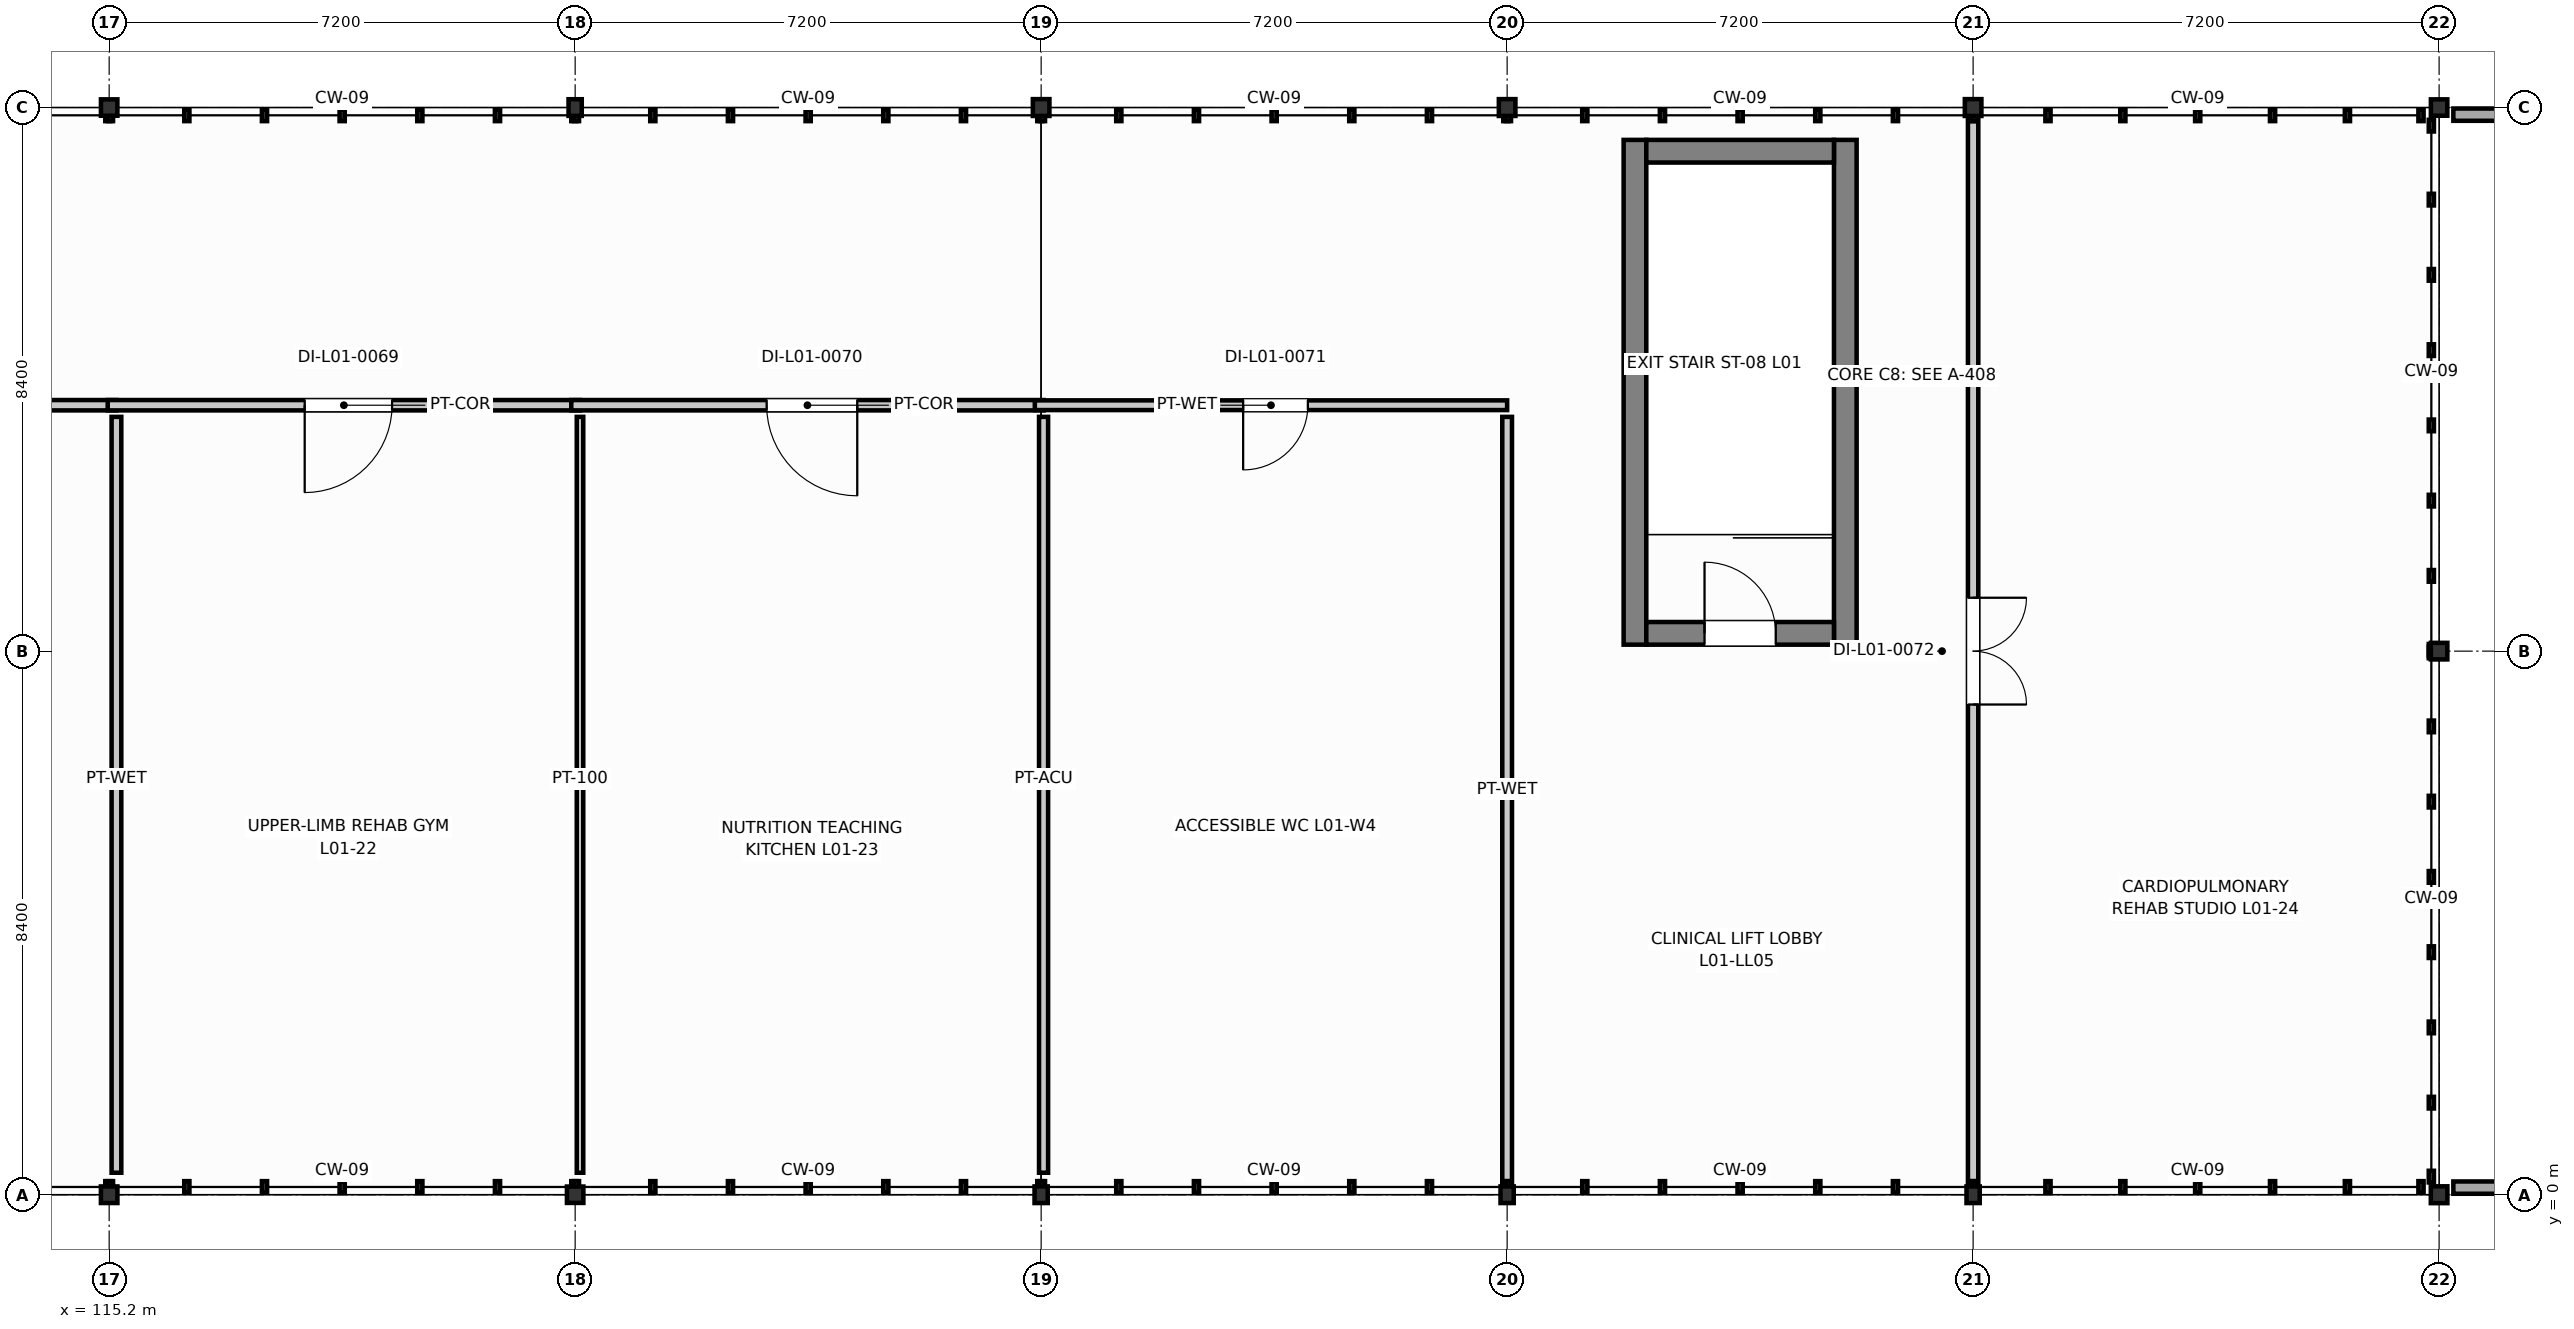
"""IFC4 building model, lengths in metres.
Left out: names, types, materials, properties, quantities, classifications, styles, units other than length and angle.
Written with IfcOpenShell. Run it as: python <this file> out.ifc"""

import sys

from ifc_helpers import new_model, si_unit, direction, frame, frame_2d, origin, origin_2d, place, context, subcontext, project, spatial, rectangle, i_section, extrude, element, fill, save


model = new_model("IFC4")
c1 = context("Model", 3, precision=1e-05, world=origin(), true_north=direction((0.0, 1.0)))
c2 = subcontext(c1, "Body", "Model", "MODEL_VIEW")
j1 = project(units=[si_unit("LENGTHUNIT", "METRE"), si_unit("PLANEANGLEUNIT", "RADIAN")], contexts=[c1])
p1 = place(None, origin())
s1 = spatial("IfcSite", under=j1, at=p1, CompositionType="ELEMENT")
p2 = place(p1, origin())
s2 = spatial("IfcBuilding", under=s1, at=p2, CompositionType="ELEMENT")
p3 = place(p2, frame((0.0, 0.0, 4.8)))
s3 = spatial("IfcBuildingStorey", under=s2, at=p3, CompositionType="ELEMENT", Elevation=4.8)
p4 = place(p3, frame((115.2, 0.0, 0.0), z_axis=(0.0, 0.0, 1.0), x_axis=(1.0, 0.0, 0.0)))
e1 = element("IfcColumn", 1, at=p4, inside=s3, PredefinedType="COLUMN", context=c2, shape_type="SweptSolid", body=[
    extrude(i_section(OverallWidth=0.255, OverallDepth=0.256, WebThickness=0.01, FlangeThickness=0.016, FilletRadius=0.013, at=origin_2d()), origin(), (0.0, 0.0, 1.0), 4.2),
])
for number, where, z_axis, x_axis in (
    (2, (115.2, 16.8, 0.0), (0.0, 0.0, 1.0), (1.0, 0.0, 0.0)),
    (3, (122.4, 0.0, 0.0), (0.0, 0.0, 1.0), (1.0, 0.0, 0.0)),
):
    element("IfcColumn", number, at=place(p3, frame(where, z_axis=z_axis, x_axis=x_axis)), inside=s3, PredefinedType="COLUMN", context=c2, shape_type="SweptSolid", body=[
        extrude(i_section(OverallWidth=0.254, OverallDepth=0.253, WebThickness=0.009, FlangeThickness=0.014, FilletRadius=0.013, at=origin_2d()), origin(), (0.0, 0.0, 1.0), 4.2),
    ])
for number, where, z_axis, x_axis in (
    (4, (122.4, 16.8, 0.0), (0.0, 0.0, 1.0), (1.0, 0.0, 0.0)),
    (5, (129.6, 0.0, 0.0), (0.0, 0.0, 1.0), (1.0, 0.0, 0.0)),
):
    element("IfcColumn", number, at=place(p3, frame(where, z_axis=z_axis, x_axis=x_axis)), inside=s3, PredefinedType="COLUMN", context=c2, shape_type="SweptSolid", body=[
        extrude(i_section(OverallWidth=0.204, OverallDepth=0.257, WebThickness=0.009, FlangeThickness=0.016, FilletRadius=0.013, at=origin_2d()), origin(), (0.0, 0.0, 1.0), 4.2),
    ])
p5 = place(p3, frame((129.6, 16.8, 0.0), z_axis=(0.0, 0.0, 1.0), x_axis=(1.0, 0.0, 0.0)))
e6 = element("IfcColumn", 6, at=p5, inside=s3, PredefinedType="COLUMN", context=c2, shape_type="SweptSolid", body=[
    extrude(i_section(OverallWidth=0.256, OverallDepth=0.26, WebThickness=0.011, FlangeThickness=0.017, FilletRadius=0.013, at=origin_2d()), origin(), (0.0, 0.0, 1.0), 4.2),
])
p6 = place(p3, frame((136.8, 0.0, 0.0), z_axis=(0.0, 0.0, 1.0), x_axis=(1.0, 0.0, 0.0)))
e7 = element("IfcColumn", 7, at=p6, inside=s3, PredefinedType="COLUMN", context=c2, shape_type="SweptSolid", body=[
    extrude(i_section(OverallWidth=0.204, OverallDepth=0.257, WebThickness=0.009, FlangeThickness=0.016, FilletRadius=0.013, at=origin_2d()), origin(), (0.0, 0.0, 1.0), 4.2),
])
p7 = place(p3, frame((136.8, 16.8, 0.0), z_axis=(0.0, 0.0, 1.0), x_axis=(1.0, 0.0, 0.0)))
e8 = element("IfcColumn", 8, at=p7, inside=s3, PredefinedType="COLUMN", context=c2, shape_type="SweptSolid", body=[
    extrude(i_section(OverallWidth=0.256, OverallDepth=0.26, WebThickness=0.011, FlangeThickness=0.017, FilletRadius=0.013, at=origin_2d()), origin(), (0.0, 0.0, 1.0), 4.2),
])
p8 = place(p3, frame((144.0, 0.0, 0.0), z_axis=(0.0, 0.0, 1.0), x_axis=(1.0, 0.0, 0.0)))
e9 = element("IfcColumn", 9, at=p8, inside=s3, PredefinedType="COLUMN", context=c2, shape_type="SweptSolid", body=[
    extrude(i_section(OverallWidth=0.204, OverallDepth=0.257, WebThickness=0.009, FlangeThickness=0.016, FilletRadius=0.013, at=origin_2d()), origin(), (0.0, 0.0, 1.0), 4.2),
])
for number, where, z_axis, x_axis in (
    (10, (144.0, 16.8, 0.0), (0.0, 0.0, 1.0), (1.0, 0.0, 0.0)),
    (11, (151.2, 0.0, 0.0), (0.0, 0.0, 1.0), (1.0, 0.0, 0.0)),
):
    element("IfcColumn", number, at=place(p3, frame(where, z_axis=z_axis, x_axis=x_axis)), inside=s3, PredefinedType="COLUMN", context=c2, shape_type="SweptSolid", body=[
        extrude(i_section(OverallWidth=0.256, OverallDepth=0.26, WebThickness=0.011, FlangeThickness=0.017, FilletRadius=0.013, at=origin_2d()), origin(), (0.0, 0.0, 1.0), 4.2),
    ])
p9 = place(p3, frame((151.2, 8.4, 0.0), z_axis=(0.0, 0.0, 1.0), x_axis=(1.0, 0.0, 0.0)))
e12 = element("IfcColumn", 12, at=p9, inside=s3, PredefinedType="COLUMN", context=c2, shape_type="SweptSolid", body=[
    extrude(i_section(OverallWidth=0.255, OverallDepth=0.256, WebThickness=0.01, FlangeThickness=0.016, FilletRadius=0.013, at=origin_2d()), origin(), (0.0, 0.0, 1.0), 4.2),
])
p10 = place(p3, frame((151.2, 16.8, 0.0), z_axis=(0.0, 0.0, 1.0), x_axis=(1.0, 0.0, 0.0)))
e13 = element("IfcColumn", 13, at=p10, inside=s3, PredefinedType="COLUMN", context=c2, shape_type="SweptSolid", body=[
    extrude(i_section(OverallWidth=0.254, OverallDepth=0.253, WebThickness=0.009, FlangeThickness=0.014, FilletRadius=0.013, at=origin_2d()), origin(), (0.0, 0.0, 1.0), 4.2),
])
for number, where, z_axis, x_axis in (
    (14, (138.775, 8.5, 0.0), (0.0, 0.0, 1.0), (0.0, 1.0, 0.0)),
    (15, (142.025, 8.5, 0.0), (0.0, 0.0, 1.0), (0.0, 1.0, 0.0)),
):
    element("IfcWall", number, at=place(p3, frame(where, z_axis=z_axis, x_axis=x_axis)), inside=s3, PredefinedType="SHEAR", context=c2, shape_type="SweptSolid", body=[
        extrude(rectangle(XDim=7.8, YDim=0.35, at=frame_2d((3.9, 0.0))), origin(), (0.0, 0.0, 1.0), 4.0),
    ])
p11 = place(p3, frame((138.95, 16.125, 0.0), z_axis=(0.0, 0.0, 1.0), x_axis=(1.0, 0.0, 0.0)))
e16 = element("IfcWall", 16, at=p11, inside=s3, PredefinedType="SHEAR", context=c2, shape_type="SweptSolid", body=[
    extrude(rectangle(XDim=2.9, YDim=0.35, at=frame_2d((1.45, 0.0))), origin(), (0.0, 0.0, 1.0), 4.0),
])
p12 = place(p3, frame((138.95, 8.675, 0.0), z_axis=(0.0, 0.0, 1.0), x_axis=(1.0, 0.0, 0.0)))
e17 = element("IfcWall", 17, at=p12, inside=s3, PredefinedType="SHEAR", context=c2, shape_type="SweptSolid", body=[
    extrude(rectangle(XDim=2.9, YDim=0.35, at=frame_2d((1.45, 0.0))), origin(), (0.0, 0.0, 1.0), 4.0),
])
p13 = place(p12, frame((0.9, 0.0, 0.0)))
e18 = element("IfcOpeningElement", 18, at=p13, cuts=e17, PredefinedType="OPENING", context=c2, shape_type="SweptSolid", body=[
    extrude(rectangle(XDim=1.1, YDim=2.15, at=frame_2d((0.55, 1.075))), frame((0.0, 0.185, 0.0), z_axis=(0.0, -1.0, 0.0), x_axis=(1.0, 0.0, 0.0)), (0.0, 0.0, 1.0), 0.37),
])
p14 = place(p3, frame((151.42, 0.11, 0.0), z_axis=(0.0, 0.0, 1.0), x_axis=(1.0, 0.0, 0.0)))
e19 = element("IfcWall", 19, at=p14, inside=s3, PredefinedType="PARAPET", context=c2, shape_type="SweptSolid", body=[
    extrude(rectangle(XDim=11.56, YDim=0.19, at=frame_2d((5.78, 0.0))), origin(), (0.0, 0.0, 1.0), 1.15),
])
p15 = place(p3, frame((162.923, 16.69, 0.0), z_axis=(0.0, 0.0, 1.0), x_axis=(-1.0, 0.0, 0.0)))
e20 = element("IfcWall", 20, at=p15, inside=s3, PredefinedType="PARAPET", context=c2, shape_type="SweptSolid", body=[
    extrude(rectangle(XDim=11.503, YDim=0.19, at=frame_2d((5.751, 0.0))), origin(), (0.0, 0.0, 1.0), 1.15),
])
p16 = place(p3, frame((108.34, 12.2, 0.0), z_axis=(0.0, 0.0, 1.0), x_axis=(1.0, 0.0, 0.0)))
e21 = element("IfcWall", 21, at=p16, inside=s3, PredefinedType="PARTITIONING", context=c2, shape_type="SweptSolid", body=[
    extrude(rectangle(XDim=6.972, YDim=0.16, at=frame_2d((3.486, 0.0))), origin(), (0.0, 0.0, 1.0), 3.018),
])
p17 = place(p16, frame((2.806, 0.0, 0.0)))
e22 = element("IfcOpeningElement", 22, at=p17, cuts=e21, PredefinedType="OPENING", context=c2, shape_type="SweptSolid", body=[
    extrude(rectangle(XDim=1.5, YDim=2.2, at=frame_2d((0.75, 1.1))), frame((0.0, 0.09, 0.0), z_axis=(0.0, -1.0, 0.0), x_axis=(1.0, 0.0, 0.0)), (0.0, 0.0, 1.0), 0.18),
])
p18 = place(p3, frame((115.312, 12.02, 0.0), z_axis=(0.0, 0.0, 1.0), x_axis=(0.0, -1.0, 0.0)))
e23 = element("IfcWall", 23, at=p18, inside=s3, PredefinedType="PLUMBINGWALL", context=c2, shape_type="SweptSolid", body=[
    extrude(rectangle(XDim=11.68, YDim=0.15, at=frame_2d((5.84, 0.0))), origin(), (0.0, 0.0, 1.0), 3.018),
])
p19 = place(p3, frame((115.177, 12.2, 0.0), z_axis=(0.0, 0.0, 1.0), x_axis=(1.0, 0.0, 0.0)))
e24 = element("IfcWall", 24, at=p19, inside=s3, PredefinedType="PARTITIONING", context=c2, shape_type="SweptSolid", body=[
    extrude(rectangle(XDim=7.298, YDim=0.16, at=frame_2d((3.649, 0.0))), origin(), (0.0, 0.0, 1.0), 3.018),
])
p20 = place(p19, frame((3.044, 0.0, 0.0)))
e25 = element("IfcOpeningElement", 25, at=p20, cuts=e24, PredefinedType="OPENING", context=c2, shape_type="SweptSolid", body=[
    extrude(rectangle(XDim=1.35, YDim=2.15, at=frame_2d((0.675, 1.075))), frame((0.0, 0.09, 0.0), z_axis=(0.0, -1.0, 0.0), x_axis=(1.0, 0.0, 0.0)), (0.0, 0.0, 1.0), 0.18),
])
p21 = place(p3, frame((122.475, 12.02, 0.0), z_axis=(0.0, 0.0, 1.0), x_axis=(0.0, -1.0, 0.0)))
e26 = element("IfcWall", 26, at=p21, inside=s3, PredefinedType="PARTITIONING", context=c2, shape_type="SweptSolid", body=[
    extrude(rectangle(XDim=11.68, YDim=0.1, at=frame_2d((5.84, 0.0))), origin(), (0.0, 0.0, 1.0), 3.018),
])
p22 = place(p3, frame((122.34, 12.2, 0.0), z_axis=(0.0, 0.0, 1.0), x_axis=(1.0, 0.0, 0.0)))
e27 = element("IfcWall", 27, at=p22, inside=s3, PredefinedType="PARTITIONING", context=c2, shape_type="SweptSolid", body=[
    extrude(rectangle(XDim=7.297, YDim=0.16, at=frame_2d((3.649, 0.0))), origin(), (0.0, 0.0, 1.0), 3.018),
])
p23 = place(p22, frame((3.019, 0.0, 0.0)))
e28 = element("IfcOpeningElement", 28, at=p23, cuts=e27, PredefinedType="OPENING", context=c2, shape_type="SweptSolid", body=[
    extrude(rectangle(XDim=1.4, YDim=2.2, at=frame_2d((0.7, 1.1))), frame((0.0, 0.09, 0.0), z_axis=(0.0, -1.0, 0.0), x_axis=(1.0, 0.0, 0.0)), (0.0, 0.0, 1.0), 0.18),
])
p24 = place(p3, frame((129.637, 12.02, 0.0), z_axis=(0.0, 0.0, 1.0), x_axis=(0.0, -1.0, 0.0)))
e29 = element("IfcWall", 29, at=p24, inside=s3, PredefinedType="PARTITIONING", context=c2, shape_type="SweptSolid", body=[
    extrude(rectangle(XDim=11.68, YDim=0.14, at=frame_2d((5.84, 0.0))), origin(), (0.0, 0.0, 1.0), 3.018),
])
p25 = place(p3, frame((129.502, 12.2, 0.0), z_axis=(0.0, 0.0, 1.0), x_axis=(1.0, 0.0, 0.0)))
e30 = element("IfcWall", 30, at=p25, inside=s3, PredefinedType="PLUMBINGWALL", context=c2, shape_type="SweptSolid", body=[
    extrude(rectangle(XDim=7.298, YDim=0.15, at=frame_2d((3.649, 0.0))), origin(), (0.0, 0.0, 1.0), 3.018),
])
p26 = place(p25, frame((3.219, 0.0, 0.0)))
e31 = element("IfcOpeningElement", 31, at=p26, cuts=e30, PredefinedType="OPENING", context=c2, shape_type="SweptSolid", body=[
    extrude(rectangle(XDim=1.0, YDim=2.1, at=frame_2d((0.5, 1.05))), frame((0.0, 0.085, 0.0), z_axis=(0.0, -1.0, 0.0), x_axis=(1.0, 0.0, 0.0)), (0.0, 0.0, 1.0), 0.17),
])
p27 = place(p3, frame((136.8, 12.02, 0.0), z_axis=(0.0, 0.0, 1.0), x_axis=(0.0, -1.0, 0.0)))
e32 = element("IfcWall", 32, at=p27, inside=s3, PredefinedType="PLUMBINGWALL", context=c2, shape_type="SweptSolid", body=[
    extrude(rectangle(XDim=12.01, YDim=0.15, at=frame_2d((6.005, 0.0))), origin(), (0.0, 0.0, 1.0), 3.018),
])
p28 = place(p3, frame((144.0, 0.01, 0.0), z_axis=(0.0, 0.0, 1.0), x_axis=(0.0, 1.0, 0.0)))
e33 = element("IfcWall", 33, at=p28, inside=s3, PredefinedType="PARTITIONING", context=c2, shape_type="SweptSolid", body=[
    extrude(rectangle(XDim=16.78, YDim=0.16, at=frame_2d((8.39, 0.0))), origin(), (0.0, 0.0, 1.0), 3.018),
])
p29 = place(p28, frame((7.565, 0.0, 0.0)))
e34 = element("IfcOpeningElement", 34, at=p29, cuts=e33, PredefinedType="OPENING", context=c2, shape_type="SweptSolid", body=[
    extrude(rectangle(XDim=1.65, YDim=2.2, at=frame_2d((0.825, 1.1))), frame((0.0, 0.09, 0.0), z_axis=(0.0, -1.0, 0.0), x_axis=(1.0, 0.0, 0.0)), (0.0, 0.0, 1.0), 0.18),
])
p30 = place(p13, origin())
e35 = element("IfcDoor", 35, at=p30, inside=s3, OperationType="SINGLE_SWING_LEFT", PredefinedType="DOOR", context=c2, shape_type="SweptSolid", body=[
    extrude(rectangle(XDim=1.1, YDim=2.15, at=frame_2d((0.55, 1.075))), frame((0.0, 0.025, 0.0), z_axis=(0.0, -1.0, 0.0), x_axis=(1.0, 0.0, 0.0)), (0.0, 0.0, 1.0), 0.05),
])
fill(e18, e35)
p31 = place(p20, frame((1.35, 0.0, 0.0), z_axis=(0.0, 0.0, 1.0), x_axis=(-1.0, 0.0, 0.0)))
e36 = element("IfcDoor", 36, at=p31, inside=s3, OperationType="SINGLE_SWING_RIGHT", PredefinedType="DOOR", context=c2, shape_type="SweptSolid", body=[
    extrude(rectangle(XDim=1.35, YDim=2.15, at=frame_2d((0.675, 1.075))), frame((0.0, 0.025, 0.0), z_axis=(0.0, -1.0, 0.0), x_axis=(1.0, 0.0, 0.0)), (0.0, 0.0, 1.0), 0.05),
])
fill(e25, e36)
p32 = place(p23, frame((1.4, 0.0, 0.0), z_axis=(0.0, 0.0, 1.0), x_axis=(-1.0, 0.0, 0.0)))
e37 = element("IfcDoor", 37, at=p32, inside=s3, OperationType="SINGLE_SWING_LEFT", PredefinedType="DOOR", context=c2, shape_type="SweptSolid", body=[
    extrude(rectangle(XDim=1.4, YDim=2.2, at=frame_2d((0.7, 1.1))), frame((0.0, 0.025, 0.0), z_axis=(0.0, -1.0, 0.0), x_axis=(1.0, 0.0, 0.0)), (0.0, 0.0, 1.0), 0.05),
])
fill(e28, e37)
p33 = place(p26, frame((1.0, 0.0, 0.0), z_axis=(0.0, 0.0, 1.0), x_axis=(-1.0, 0.0, 0.0)))
e38 = element("IfcDoor", 38, at=p33, inside=s3, OperationType="SINGLE_SWING_RIGHT", PredefinedType="DOOR", context=c2, shape_type="SweptSolid", body=[
    extrude(rectangle(XDim=1.0, YDim=2.1, at=frame_2d((0.5, 1.05))), frame((0.0, 0.025, 0.0), z_axis=(0.0, -1.0, 0.0), x_axis=(1.0, 0.0, 0.0)), (0.0, 0.0, 1.0), 0.05),
])
fill(e31, e38)
p34 = place(p29, frame((1.65, 0.0, 0.0), z_axis=(0.0, 0.0, 1.0), x_axis=(-1.0, 0.0, 0.0)))
e39 = element("IfcDoor", 39, at=p34, inside=s3, OperationType="DOUBLE_DOOR_SINGLE_SWING", PredefinedType="DOOR", context=c2, shape_type="SweptSolid", body=[
    extrude(rectangle(XDim=1.65, YDim=2.2, at=frame_2d((0.825, 1.1))), frame((0.0, 0.025, 0.0), z_axis=(0.0, -1.0, 0.0), x_axis=(1.0, 0.0, 0.0)), (0.0, 0.0, 1.0), 0.05),
])
fill(e34, e39)
save(model, sys.argv[1])
